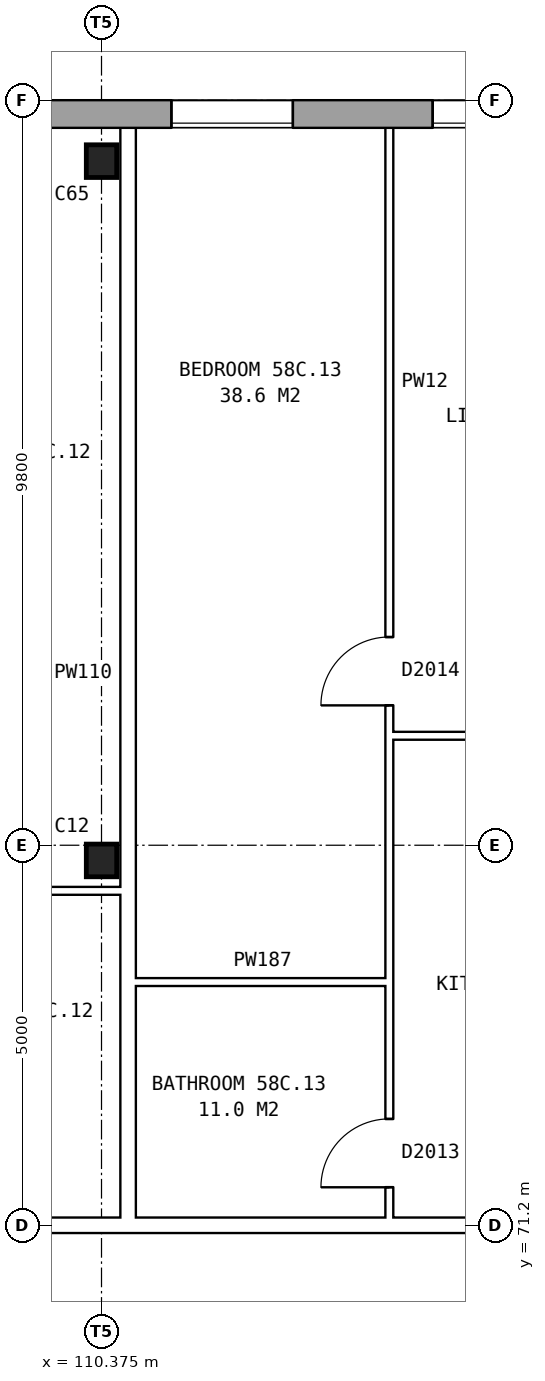
"""IFC4 building model, lengths in metres.
Left out: names, types, materials, properties, quantities, classifications, styles, units other than length and angle.
Written with IfcOpenShell. Run it as: python <this file> out.ifc"""

import sys

from ifc_helpers import new_model, si_unit, direction, frame, frame_2d, origin, origin_2d, place, context, subcontext, project, spatial, rectangle, i_section, extrude, element, fill, save


model = new_model("IFC4")
c1 = context("Model", 3, precision=1e-05, world=origin(), true_north=direction((0.0, 1.0)))
c2 = subcontext(c1, "Body", "Model", "MODEL_VIEW")
j1 = project(units=[si_unit("LENGTHUNIT", "METRE"), si_unit("PLANEANGLEUNIT", "RADIAN")], contexts=[c1])
p1 = place(None, origin())
s1 = spatial("IfcSite", under=j1, at=p1, CompositionType="ELEMENT")
p2 = place(p1, origin())
s2 = spatial("IfcBuilding", under=s1, at=p2, CompositionType="ELEMENT")
p3 = place(p2, frame((0.0, 0.0, 205.9)))
s3 = spatial("IfcBuildingStorey", under=s2, at=p3, CompositionType="ELEMENT", Elevation=205.9)
for number, where, z_axis, x_axis in (
    (1, (110.375, 76.0, 0.0), (0.0, 0.0, 1.0), (1.0, 0.0, 0.0)),
    (2, (110.375, 85.2, 0.0), (0.0, 0.0, 1.0), (1.0, 0.0, 0.0)),
):
    element("IfcColumn", number, at=place(p3, frame(where, z_axis=z_axis, x_axis=x_axis)), inside=s3, PredefinedType="COLUMN", context=c2, shape_type="SweptSolid", body=[
        extrude(i_section(OverallWidth=0.4, OverallDepth=0.43, WebThickness=0.04, FlangeThickness=0.04, at=origin_2d()), origin(), (0.0, 0.0, 1.0), 2.85),
    ])
p4 = place(p3, frame((131.05, 85.82, 0.0), z_axis=(0.0, 0.0, 1.0), x_axis=(-1.0, 0.0, 0.0)))
e3 = element("IfcWall", 3, at=p4, inside=s3, PredefinedType="STANDARD", context=c2, shape_type="SweptSolid", body=[
    extrude(rectangle(XDim=55.1, YDim=0.36, at=frame_2d((27.55, 0.0))), origin(), (0.0, 0.0, 1.0), 2.85),
])
p5 = place(p4, frame((0.969, 0.0, 0.8)))
e4 = element("IfcOpeningElement", 4, at=p5, cuts=e3, PredefinedType="OPENING", context=c2, shape_type="SweptSolid", body=[
    extrude(rectangle(XDim=1.6, YDim=1.8, at=frame_2d((0.8, 0.9))), frame((0.0, 0.19, 0.0), z_axis=(0.0, -1.0, 0.0), x_axis=(1.0, 0.0, 0.0)), (0.0, 0.0, 1.0), 0.38),
])
p6 = place(p4, frame((4.406, 0.0, 0.8)))
e5 = element("IfcOpeningElement", 5, at=p6, cuts=e3, PredefinedType="OPENING", context=c2, shape_type="SweptSolid", body=[
    extrude(rectangle(XDim=1.6, YDim=1.8, at=frame_2d((0.8, 0.9))), frame((0.0, 0.19, 0.0), z_axis=(0.0, -1.0, 0.0), x_axis=(1.0, 0.0, 0.0)), (0.0, 0.0, 1.0), 0.38),
])
p7 = place(p4, frame((7.844, 0.0, 0.8)))
e6 = element("IfcOpeningElement", 6, at=p7, cuts=e3, PredefinedType="OPENING", context=c2, shape_type="SweptSolid", body=[
    extrude(rectangle(XDim=1.6, YDim=1.8, at=frame_2d((0.8, 0.9))), frame((0.0, 0.19, 0.0), z_axis=(0.0, -1.0, 0.0), x_axis=(1.0, 0.0, 0.0)), (0.0, 0.0, 1.0), 0.38),
])
p8 = place(p4, frame((11.281, 0.0, 0.8)))
e7 = element("IfcOpeningElement", 7, at=p8, cuts=e3, PredefinedType="OPENING", context=c2, shape_type="SweptSolid", body=[
    extrude(rectangle(XDim=1.6, YDim=1.8, at=frame_2d((0.8, 0.9))), frame((0.0, 0.19, 0.0), z_axis=(0.0, -1.0, 0.0), x_axis=(1.0, 0.0, 0.0)), (0.0, 0.0, 1.0), 0.38),
])
p9 = place(p4, frame((14.719, 0.0, 0.8)))
e8 = element("IfcOpeningElement", 8, at=p9, cuts=e3, PredefinedType="OPENING", context=c2, shape_type="SweptSolid", body=[
    extrude(rectangle(XDim=1.6, YDim=1.8, at=frame_2d((0.8, 0.9))), frame((0.0, 0.19, 0.0), z_axis=(0.0, -1.0, 0.0), x_axis=(1.0, 0.0, 0.0)), (0.0, 0.0, 1.0), 0.38),
])
p10 = place(p4, frame((18.156, 0.0, 0.8)))
e9 = element("IfcOpeningElement", 9, at=p10, cuts=e3, PredefinedType="OPENING", context=c2, shape_type="SweptSolid", body=[
    extrude(rectangle(XDim=1.6, YDim=1.8, at=frame_2d((0.8, 0.9))), frame((0.0, 0.19, 0.0), z_axis=(0.0, -1.0, 0.0), x_axis=(1.0, 0.0, 0.0)), (0.0, 0.0, 1.0), 0.38),
])
p11 = place(p4, frame((21.594, 0.0, 0.8)))
e10 = element("IfcOpeningElement", 10, at=p11, cuts=e3, PredefinedType="OPENING", context=c2, shape_type="SweptSolid", body=[
    extrude(rectangle(XDim=1.6, YDim=1.8, at=frame_2d((0.8, 0.9))), frame((0.0, 0.19, 0.0), z_axis=(0.0, -1.0, 0.0), x_axis=(1.0, 0.0, 0.0)), (0.0, 0.0, 1.0), 0.38),
])
p12 = place(p4, frame((25.031, 0.0, 0.8)))
e11 = element("IfcOpeningElement", 11, at=p12, cuts=e3, PredefinedType="OPENING", context=c2, shape_type="SweptSolid", body=[
    extrude(rectangle(XDim=1.6, YDim=1.8, at=frame_2d((0.8, 0.9))), frame((0.0, 0.19, 0.0), z_axis=(0.0, -1.0, 0.0), x_axis=(1.0, 0.0, 0.0)), (0.0, 0.0, 1.0), 0.38),
])
p13 = place(p4, frame((28.469, 0.0, 0.8)))
e12 = element("IfcOpeningElement", 12, at=p13, cuts=e3, PredefinedType="OPENING", context=c2, shape_type="SweptSolid", body=[
    extrude(rectangle(XDim=1.6, YDim=1.8, at=frame_2d((0.8, 0.9))), frame((0.0, 0.19, 0.0), z_axis=(0.0, -1.0, 0.0), x_axis=(1.0, 0.0, 0.0)), (0.0, 0.0, 1.0), 0.38),
])
p14 = place(p4, frame((31.906, 0.0, 0.8)))
e13 = element("IfcOpeningElement", 13, at=p14, cuts=e3, PredefinedType="OPENING", context=c2, shape_type="SweptSolid", body=[
    extrude(rectangle(XDim=1.6, YDim=1.8, at=frame_2d((0.8, 0.9))), frame((0.0, 0.19, 0.0), z_axis=(0.0, -1.0, 0.0), x_axis=(1.0, 0.0, 0.0)), (0.0, 0.0, 1.0), 0.38),
])
p15 = place(p4, frame((35.344, 0.0, 0.8)))
e14 = element("IfcOpeningElement", 14, at=p15, cuts=e3, PredefinedType="OPENING", context=c2, shape_type="SweptSolid", body=[
    extrude(rectangle(XDim=1.6, YDim=1.8, at=frame_2d((0.8, 0.9))), frame((0.0, 0.19, 0.0), z_axis=(0.0, -1.0, 0.0), x_axis=(1.0, 0.0, 0.0)), (0.0, 0.0, 1.0), 0.38),
])
p16 = place(p4, frame((38.781, 0.0, 0.8)))
e15 = element("IfcOpeningElement", 15, at=p16, cuts=e3, PredefinedType="OPENING", context=c2, shape_type="SweptSolid", body=[
    extrude(rectangle(XDim=1.6, YDim=1.8, at=frame_2d((0.8, 0.9))), frame((0.0, 0.19, 0.0), z_axis=(0.0, -1.0, 0.0), x_axis=(1.0, 0.0, 0.0)), (0.0, 0.0, 1.0), 0.38),
])
p17 = place(p4, frame((42.219, 0.0, 0.8)))
e16 = element("IfcOpeningElement", 16, at=p17, cuts=e3, PredefinedType="OPENING", context=c2, shape_type="SweptSolid", body=[
    extrude(rectangle(XDim=1.6, YDim=1.8, at=frame_2d((0.8, 0.9))), frame((0.0, 0.19, 0.0), z_axis=(0.0, -1.0, 0.0), x_axis=(1.0, 0.0, 0.0)), (0.0, 0.0, 1.0), 0.38),
])
p18 = place(p4, frame((45.656, 0.0, 0.8)))
e17 = element("IfcOpeningElement", 17, at=p18, cuts=e3, PredefinedType="OPENING", context=c2, shape_type="SweptSolid", body=[
    extrude(rectangle(XDim=1.6, YDim=1.8, at=frame_2d((0.8, 0.9))), frame((0.0, 0.19, 0.0), z_axis=(0.0, -1.0, 0.0), x_axis=(1.0, 0.0, 0.0)), (0.0, 0.0, 1.0), 0.38),
])
p19 = place(p4, frame((49.094, 0.0, 0.8)))
e18 = element("IfcOpeningElement", 18, at=p19, cuts=e3, PredefinedType="OPENING", context=c2, shape_type="SweptSolid", body=[
    extrude(rectangle(XDim=1.6, YDim=1.8, at=frame_2d((0.8, 0.9))), frame((0.0, 0.19, 0.0), z_axis=(0.0, -1.0, 0.0), x_axis=(1.0, 0.0, 0.0)), (0.0, 0.0, 1.0), 0.38),
])
p20 = place(p4, frame((52.531, 0.0, 0.8)))
e19 = element("IfcOpeningElement", 19, at=p20, cuts=e3, PredefinedType="OPENING", context=c2, shape_type="SweptSolid", body=[
    extrude(rectangle(XDim=1.6, YDim=1.8, at=frame_2d((0.8, 0.9))), frame((0.0, 0.19, 0.0), z_axis=(0.0, -1.0, 0.0), x_axis=(1.0, 0.0, 0.0)), (0.0, 0.0, 1.0), 0.38),
])
p21 = place(p3, frame((83.225, 71.2, 0.0), z_axis=(0.0, 0.0, 1.0), x_axis=(1.0, 0.0, 0.0)))
e20 = element("IfcWall", 20, at=p21, inside=s3, PredefinedType="PARTITIONING", context=c2, shape_type="SweptSolid", body=[
    extrude(rectangle(XDim=41.25, YDim=0.2, at=frame_2d((20.625, 0.0))), origin(), (0.0, 0.0, 1.0), 2.85),
])
p22 = place(p21, frame((4.656, 0.0, 0.0)))
e21 = element("IfcOpeningElement", 21, at=p22, cuts=e20, PredefinedType="OPENING", context=c2, shape_type="SweptSolid", body=[
    extrude(rectangle(XDim=1.0, YDim=2.1, at=frame_2d((0.5, 1.05))), frame((0.0, 0.11, 0.0), z_axis=(0.0, -1.0, 0.0), x_axis=(1.0, 0.0, 0.0)), (0.0, 0.0, 1.0), 0.22),
])
p23 = place(p21, frame((11.531, 0.0, 0.0)))
e22 = element("IfcOpeningElement", 22, at=p23, cuts=e20, PredefinedType="OPENING", context=c2, shape_type="SweptSolid", body=[
    extrude(rectangle(XDim=1.0, YDim=2.1, at=frame_2d((0.5, 1.05))), frame((0.0, 0.11, 0.0), z_axis=(0.0, -1.0, 0.0), x_axis=(1.0, 0.0, 0.0)), (0.0, 0.0, 1.0), 0.22),
])
p24 = place(p21, frame((21.844, 0.0, 0.0)))
e23 = element("IfcOpeningElement", 23, at=p24, cuts=e20, PredefinedType="OPENING", context=c2, shape_type="SweptSolid", body=[
    extrude(rectangle(XDim=1.0, YDim=2.1, at=frame_2d((0.5, 1.05))), frame((0.0, 0.11, 0.0), z_axis=(0.0, -1.0, 0.0), x_axis=(1.0, 0.0, 0.0)), (0.0, 0.0, 1.0), 0.22),
])
p25 = place(p21, frame((32.156, 0.0, 0.0)))
e24 = element("IfcOpeningElement", 24, at=p25, cuts=e20, PredefinedType="OPENING", context=c2, shape_type="SweptSolid", body=[
    extrude(rectangle(XDim=1.0, YDim=2.1, at=frame_2d((0.5, 1.05))), frame((0.0, 0.11, 0.0), z_axis=(0.0, -1.0, 0.0), x_axis=(1.0, 0.0, 0.0)), (0.0, 0.0, 1.0), 0.22),
])
p26 = place(p21, frame((35.594, 0.0, 0.0)))
e25 = element("IfcOpeningElement", 25, at=p26, cuts=e20, PredefinedType="OPENING", context=c2, shape_type="SweptSolid", body=[
    extrude(rectangle(XDim=1.0, YDim=2.1, at=frame_2d((0.5, 1.05))), frame((0.0, 0.11, 0.0), z_axis=(0.0, -1.0, 0.0), x_axis=(1.0, 0.0, 0.0)), (0.0, 0.0, 1.0), 0.22),
])
p27 = place(p3, frame((110.825, 74.4, 0.0), z_axis=(0.0, 0.0, 1.0), x_axis=(1.0, 0.0, 0.0)))
e26 = element("IfcWall", 26, at=p27, inside=s3, PredefinedType="PARTITIONING", context=c2, shape_type="SweptSolid", body=[
    extrude(rectangle(XDim=3.337, YDim=0.1, at=frame_2d((1.668, 0.0))), origin(), (0.0, 0.0, 1.0), 2.85),
])
p28 = place(p3, frame((107.287, 75.6, 0.0), z_axis=(0.0, 0.0, 1.0), x_axis=(1.0, 0.0, 0.0)))
e27 = element("IfcWall", 27, at=p28, inside=s3, PredefinedType="PARTITIONING", context=c2, shape_type="SweptSolid", body=[
    extrude(rectangle(XDim=3.338, YDim=0.1, at=frame_2d((1.669, 0.0))), origin(), (0.0, 0.0, 1.0), 2.85),
])
p29 = place(p3, frame((114.162, 77.64, 0.0), z_axis=(0.0, 0.0, 1.0), x_axis=(1.0, 0.0, 0.0)))
e28 = element("IfcWall", 28, at=p29, inside=s3, PredefinedType="PARTITIONING", context=c2, shape_type="SweptSolid", body=[
    extrude(rectangle(XDim=6.875, YDim=0.1, at=frame_2d((3.438, 0.0))), origin(), (0.0, 0.0, 1.0), 2.85),
])
p30 = place(p29, frame((1.269, 0.0, 0.0)))
e29 = element("IfcOpeningElement", 29, at=p30, cuts=e28, PredefinedType="OPENING", context=c2, shape_type="SweptSolid", body=[
    extrude(rectangle(XDim=0.9, YDim=2.1, at=frame_2d((0.45, 1.05))), frame((0.0, 0.06, 0.0), z_axis=(0.0, -1.0, 0.0), x_axis=(1.0, 0.0, 0.0)), (0.0, 0.0, 1.0), 0.12),
])
p31 = place(p29, frame((4.707, 0.0, 0.0)))
e30 = element("IfcOpeningElement", 30, at=p31, cuts=e28, PredefinedType="OPENING", context=c2, shape_type="SweptSolid", body=[
    extrude(rectangle(XDim=0.9, YDim=2.1, at=frame_2d((0.45, 1.05))), frame((0.0, 0.06, 0.0), z_axis=(0.0, -1.0, 0.0), x_axis=(1.0, 0.0, 0.0)), (0.0, 0.0, 1.0), 0.12),
])
p32 = place(p3, frame((110.725, 71.3, 0.0), z_axis=(0.0, 0.0, 1.0), x_axis=(0.0, 1.0, 0.0)))
e31 = element("IfcWall", 31, at=p32, inside=s3, PredefinedType="PARTITIONING", context=c2, shape_type="SweptSolid", body=[
    extrude(rectangle(XDim=14.34, YDim=0.2, at=frame_2d((7.17, 0.0))), origin(), (0.0, 0.0, 1.0), 2.85),
])
p33 = place(p3, frame((114.162, 71.3, 0.0), z_axis=(0.0, 0.0, 1.0), x_axis=(0.0, 1.0, 0.0)))
e32 = element("IfcWall", 32, at=p33, inside=s3, PredefinedType="PARTITIONING", context=c2, shape_type="SweptSolid", body=[
    extrude(rectangle(XDim=14.34, YDim=0.1, at=frame_2d((7.17, 0.0))), origin(), (0.0, 0.0, 1.0), 2.85),
])
p34 = place(p33, frame((6.74, 0.0, 0.0)))
e33 = element("IfcOpeningElement", 33, at=p34, cuts=e32, PredefinedType="OPENING", context=c2, shape_type="SweptSolid", body=[
    extrude(rectangle(XDim=0.9, YDim=2.1, at=frame_2d((0.45, 1.05))), frame((0.0, 0.06, 0.0), z_axis=(0.0, -1.0, 0.0), x_axis=(1.0, 0.0, 0.0)), (0.0, 0.0, 1.0), 0.12),
])
p35 = place(p33, frame((0.4, 0.0, 0.0)))
e34 = element("IfcOpeningElement", 34, at=p35, cuts=e32, PredefinedType="OPENING", context=c2, shape_type="SweptSolid", body=[
    extrude(rectangle(XDim=0.9, YDim=2.1, at=frame_2d((0.45, 1.05))), frame((0.0, 0.06, 0.0), z_axis=(0.0, -1.0, 0.0), x_axis=(1.0, 0.0, 0.0)), (0.0, 0.0, 1.0), 0.12),
])
p36 = place(p9, origin())
e35 = element("IfcWindow", 35, at=p36, inside=s3, PartitioningType="SINGLE_PANEL", PredefinedType="WINDOW", context=c2, shape_type="SweptSolid", body=[
    extrude(rectangle(XDim=1.6, YDim=1.8, at=frame_2d((0.8, 0.9))), frame((0.0, 0.15, 0.0), z_axis=(0.0, -1.0, 0.0), x_axis=(1.0, 0.0, 0.0)), (0.0, 0.0, 1.0), 0.06),
])
fill(e8, e35)
p37 = place(p10, origin())
e36 = element("IfcWindow", 36, at=p37, inside=s3, PartitioningType="SINGLE_PANEL", PredefinedType="WINDOW", context=c2, shape_type="SweptSolid", body=[
    extrude(rectangle(XDim=1.6, YDim=1.8, at=frame_2d((0.8, 0.9))), frame((0.0, 0.15, 0.0), z_axis=(0.0, -1.0, 0.0), x_axis=(1.0, 0.0, 0.0)), (0.0, 0.0, 1.0), 0.06),
])
fill(e9, e36)
p38 = place(p34, origin())
e37 = element("IfcDoor", 37, at=p38, inside=s3, OperationType="SINGLE_SWING_LEFT", PredefinedType="DOOR", context=c2, shape_type="SweptSolid", body=[
    extrude(rectangle(XDim=0.9, YDim=2.1, at=frame_2d((0.45, 1.05))), frame((0.0, 0.025, 0.0), z_axis=(0.0, -1.0, 0.0), x_axis=(1.0, 0.0, 0.0)), (0.0, 0.0, 1.0), 0.05),
])
fill(e33, e37)
p39 = place(p35, origin())
e38 = element("IfcDoor", 38, at=p39, inside=s3, OperationType="SINGLE_SWING_LEFT", PredefinedType="DOOR", context=c2, shape_type="SweptSolid", body=[
    extrude(rectangle(XDim=0.9, YDim=2.1, at=frame_2d((0.45, 1.05))), frame((0.0, 0.025, 0.0), z_axis=(0.0, -1.0, 0.0), x_axis=(1.0, 0.0, 0.0)), (0.0, 0.0, 1.0), 0.05),
])
fill(e34, e38)
save(model, sys.argv[1])
